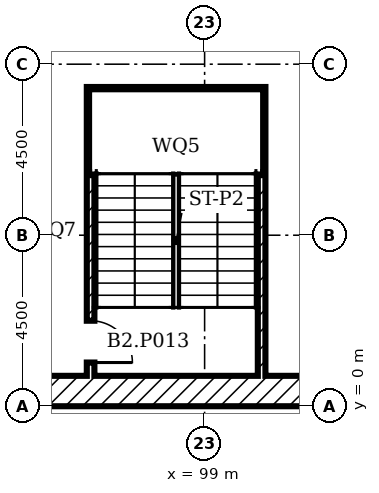
"""IFC4 building model, lengths in metres.
Left out: names, types, materials, properties, quantities, classifications, styles, units other than length and angle.
Written with IfcOpenShell. Run it as: python <this file> out.ifc"""

import sys

from ifc_helpers import new_model, si_unit, direction, frame, frame_2d, origin, place, context, subcontext, project, spatial, rectangle, extrude, element, fill, save


model = new_model("IFC4")
c1 = context("Model", 3, precision=1e-05, world=origin(), true_north=direction((0.0, 1.0)))
c2 = subcontext(c1, "Body", "Model", "MODEL_VIEW")
j1 = project(units=[si_unit("LENGTHUNIT", "METRE"), si_unit("PLANEANGLEUNIT", "RADIAN")], contexts=[c1])
p1 = place(None, origin())
s1 = spatial("IfcSite", under=j1, at=p1, CompositionType="ELEMENT")
p2 = place(p1, origin())
s2 = spatial("IfcBuilding", under=s1, at=p2, CompositionType="ELEMENT")
p3 = place(p2, frame((0.0, 0.0, -8.0)))
s3 = spatial("IfcBuildingStorey", under=s2, at=p3, CompositionType="ELEMENT", Elevation=-8.0)
p4 = place(p3, frame((0.0, 0.4, 0.0)))
e1 = element("IfcWall", 1, at=p4, inside=s3, PredefinedType="SOLIDWALL", context=c2, shape_type="SweptSolid", body=[
    extrude(rectangle(XDim=153.0, YDim=0.8, at=frame_2d((76.5, 0.0))), origin(), (0.0, 0.0, 1.0), 4.0),
])
p5 = place(p3, frame((96.0, 0.8, 0.0), z_axis=(0.0, 0.0, 1.0), x_axis=(0.0, 1.0, 0.0)))
e2 = element("IfcWall", 2, at=p5, inside=s3, PredefinedType="SOLIDWALL", context=c2, shape_type="SweptSolid", body=[
    extrude(rectangle(XDim=7.6, YDim=0.2, at=frame_2d((3.8, 0.0))), origin(), (0.0, 0.0, 1.0), 3.55),
])
p6 = place(p5, frame((0.35, 0.0, 0.0)))
e3 = element("IfcOpeningElement", 3, at=p6, cuts=e2, PredefinedType="OPENING", context=c2, shape_type="SweptSolid", body=[
    extrude(rectangle(XDim=1.1, YDim=2.1, at=frame_2d((0.55, 1.05))), frame((0.0, 0.11, 0.0), z_axis=(0.0, -1.0, 0.0), x_axis=(1.0, 0.0, 0.0)), (0.0, 0.0, 1.0), 0.22),
])
p7 = place(p3, frame((100.5, 0.8, 0.0), z_axis=(0.0, 0.0, 1.0), x_axis=(0.0, 1.0, 0.0)))
e4 = element("IfcWall", 4, at=p7, inside=s3, PredefinedType="SOLIDWALL", context=c2, shape_type="SweptSolid", body=[
    extrude(rectangle(XDim=7.6, YDim=0.2, at=frame_2d((3.8, 0.0))), origin(), (0.0, 0.0, 1.0), 3.55),
])
p8 = place(p3, frame((96.1, 8.3, 0.0)))
e5 = element("IfcWall", 5, at=p8, inside=s3, PredefinedType="SOLIDWALL", context=c2, shape_type="SweptSolid", body=[
    extrude(rectangle(XDim=4.3, YDim=0.2, at=frame_2d((2.15, 0.0))), origin(), (0.0, 0.0, 1.0), 3.55),
])
for number, where in (
    (6, (96.1, 6.22, 0.0)),
    (7, (96.1, 7.6, 0.0)),
):
    element("IfcWall", number, at=place(p3, frame(where)), inside=s3, PredefinedType="SOLIDWALL", context=c2, shape_type="SweptSolid", body=[
        extrude(rectangle(XDim=4.3, YDim=0.2, at=frame_2d((2.15, 0.0))), origin(), (0.0, 0.0, 1.0), 1.8),
    ])
p9 = place(p6, frame((1.1, 0.0, 0.0), x_axis=(-1.0, 0.0, 0.0)))
e8 = element("IfcDoor", 8, at=p9, inside=s3, OperationType="SINGLE_SWING_LEFT", PredefinedType="DOOR", context=c2, shape_type="SweptSolid", body=[
    extrude(rectangle(XDim=1.1, YDim=2.1, at=frame_2d((0.55, 1.05))), frame((0.0, 0.025, 0.0), z_axis=(0.0, -1.0, 0.0), x_axis=(1.0, 0.0, 0.0)), (0.0, 0.0, 1.0), 0.05),
])
fill(e3, e8)
save(model, sys.argv[1])
